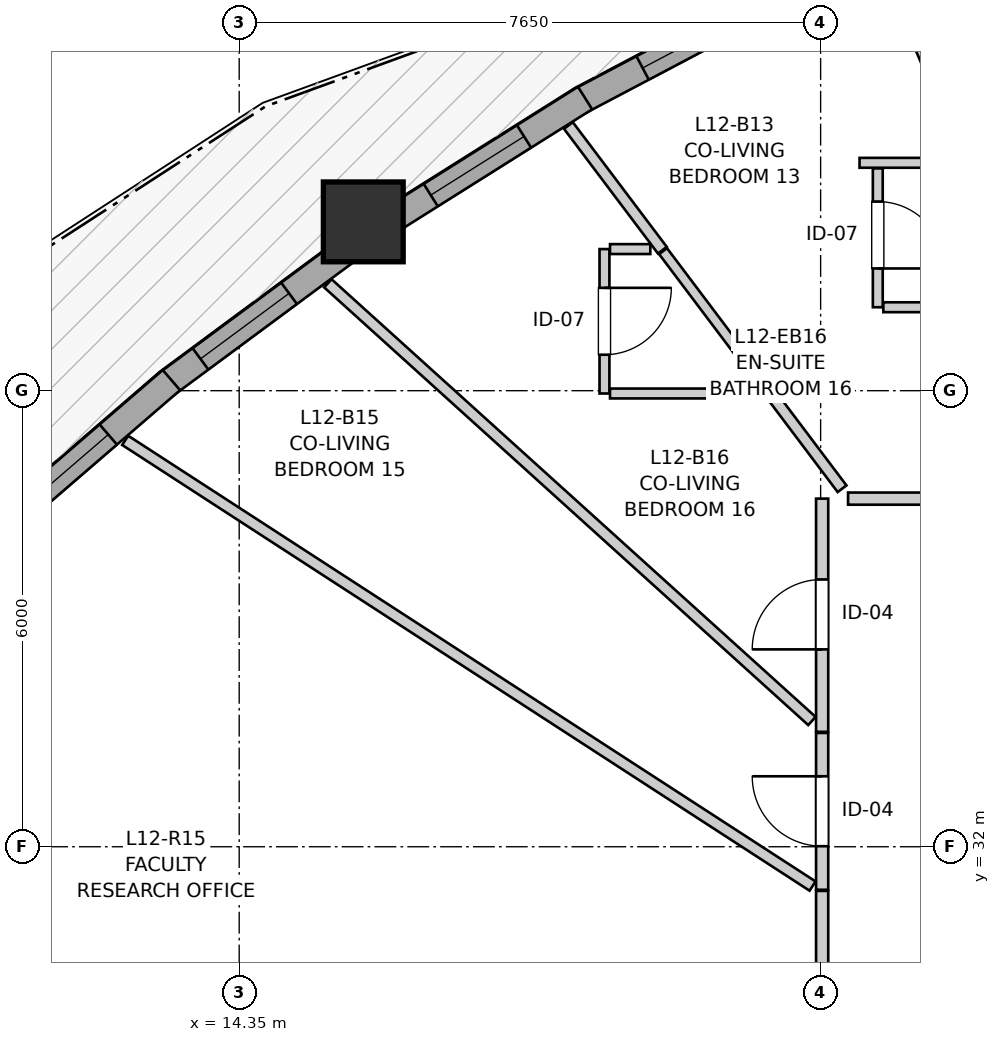
"""IFC4 building model, lengths in metres.
Left out: names, types, materials, properties, quantities, classifications, styles, units other than length and angle.
Written with IfcOpenShell. Run it as: python <this file> out.ifc"""

import sys

from ifc_helpers import new_model, si_unit, direction, frame, frame_2d, origin, origin_2d, place, context, subcontext, project, spatial, rectangle, extrude, source, transform, mapped, element, fill, save


model = new_model("IFC4")
c1 = context("Model", 3, precision=1e-05, world=origin(), true_north=direction((0.0, 1.0)))
c2 = subcontext(c1, "Body", "Model", "MODEL_VIEW")
j1 = project(units=[si_unit("LENGTHUNIT", "METRE"), si_unit("PLANEANGLEUNIT", "RADIAN")], contexts=[c1])
p1 = place(None, origin())
s1 = spatial("IfcSite", under=j1, at=p1, CompositionType="ELEMENT")
p2 = place(p1, origin())
s2 = spatial("IfcBuilding", under=s1, at=p2, CompositionType="ELEMENT")
p3 = place(p2, frame((0.0, 0.0, 43.0)))
s3 = spatial("IfcBuildingStorey", under=s2, at=p3, CompositionType="ELEMENT", Elevation=43.0)
m1 = source(origin(), c2, "Body", "SweptSolid", [
    extrude(rectangle(XDim=1.05, YDim=1.05, at=origin_2d()), origin(), (0.0, 0.0, 1.0), 2.94),
])
p4 = place(p3, frame((15.983, 40.221, 0.0), z_axis=(0.0, 0.0, 1.0), x_axis=(1.0, 0.0, 0.0)))
e1 = element("IfcColumn", 1, at=p4, inside=s3, PredefinedType="COLUMN", context=c2, shape_type="MappedRepresentation", body=[
    mapped(m1, transform((0.0, 0.0, 0.0), x_axis=(1.0, 0.0, 0.0), y_axis=(0.0, 1.0, 0.0), z_axis=(0.0, 0.0, 1.0), scale=1.0)),
])
p5 = place(p3, frame((21.757, 43.354, 0.0), z_axis=(0.0, 0.0, 1.0), x_axis=(-0.884394035355, -0.466741031224, 0.0)))
e2 = element("IfcWall", 2, at=p5, inside=s3, PredefinedType="SOLIDWALL", context=c2, shape_type="SweptSolid", body=[
    extrude(rectangle(XDim=3.317, YDim=0.35, at=frame_2d((1.659, 0.0))), origin(), (0.0, 0.0, 1.0), 2.42),
])
p6 = place(p5, frame((0.924, 0.0, 0.82)))
e3 = element("IfcOpeningElement", 3, at=p6, cuts=e2, PredefinedType="OPENING", context=c2, shape_type="SweptSolid", body=[
    extrude(rectangle(XDim=1.45, YDim=1.25, at=frame_2d((0.725, 0.625))), frame((0.0, 0.185, 0.0), z_axis=(0.0, -1.0, 0.0), x_axis=(1.0, 0.0, 0.0)), (0.0, 0.0, 1.0), 0.37),
])
p7 = place(p3, frame((18.901, 41.85, 0.0), z_axis=(0.0, 0.0, 1.0), x_axis=(-0.846436796602, -0.532489201167, 0.0)))
e4 = element("IfcWall", 4, at=p7, inside=s3, PredefinedType="SOLIDWALL", context=c2, shape_type="SweptSolid", body=[
    extrude(rectangle(XDim=3.038, YDim=0.35, at=frame_2d((1.519, 0.0))), origin(), (0.0, 0.0, 1.0), 2.42),
])
p8 = place(p7, frame((0.948, 0.0, 0.82)))
e5 = element("IfcOpeningElement", 5, at=p8, cuts=e4, PredefinedType="OPENING", context=c2, shape_type="SweptSolid", body=[
    extrude(rectangle(XDim=1.45, YDim=1.25, at=frame_2d((0.725, 0.625))), frame((0.0, 0.185, 0.0), z_axis=(0.0, -1.0, 0.0), x_axis=(1.0, 0.0, 0.0)), (0.0, 0.0, 1.0), 0.37),
])
p9 = place(p3, frame((15.846, 39.902, 0.0), z_axis=(0.0, 0.0, 1.0), x_axis=(-0.803789189233, -0.594914228501, 0.0)))
e6 = element("IfcWall", 6, at=p9, inside=s3, PredefinedType="SOLIDWALL", context=c2, shape_type="SweptSolid", body=[
    extrude(rectangle(XDim=3.056, YDim=0.35, at=frame_2d((1.528, 0.0))), origin(), (0.0, 0.0, 1.0), 2.42),
])
p10 = place(p9, frame((1.044, 0.0, 0.82)))
e7 = element("IfcOpeningElement", 7, at=p10, cuts=e6, PredefinedType="OPENING", context=c2, shape_type="SweptSolid", body=[
    extrude(rectangle(XDim=1.45, YDim=1.25, at=frame_2d((0.725, 0.625))), frame((0.0, 0.185, 0.0), z_axis=(0.0, -1.0, 0.0), x_axis=(1.0, 0.0, 0.0)), (0.0, 0.0, 1.0), 0.37),
])
p11 = place(p3, frame((13.458, 38.139, 0.0), z_axis=(0.0, 0.0, 1.0), x_axis=(-0.757450680395, -0.652892385289, 0.0)))
e8 = element("IfcWall", 8, at=p11, inside=s3, PredefinedType="SOLIDWALL", context=c2, shape_type="SweptSolid", body=[
    extrude(rectangle(XDim=3.374, YDim=0.35, at=frame_2d((1.687, 0.0))), origin(), (0.0, 0.0, 1.0), 2.42),
])
p12 = place(p11, frame((1.097, 0.0, 0.82)))
e9 = element("IfcOpeningElement", 9, at=p12, cuts=e8, PredefinedType="OPENING", context=c2, shape_type="SweptSolid", body=[
    extrude(rectangle(XDim=1.95, YDim=1.4, at=frame_2d((0.975, 0.7))), frame((0.0, 0.185, 0.0), z_axis=(0.0, -1.0, 0.0), x_axis=(1.0, 0.0, 0.0)), (0.0, 0.0, 1.0), 0.37),
])
p13 = place(p3, frame((22.02, 27.85, 0.0), z_axis=(0.0, 0.0, 1.0), x_axis=(0.0, 1.0, 0.0)))
e10 = element("IfcWall", 10, at=p13, inside=s3, PredefinedType="PARTITIONING", context=c2, shape_type="SweptSolid", body=[
    extrude(rectangle(XDim=3.569, YDim=0.16, at=frame_2d((1.784, 0.0))), origin(), (0.0, 0.0, 1.0), 2.94),
])
p14 = place(p13, frame((1.325, 0.0, 0.0)))
e11 = element("IfcOpeningElement", 11, at=p14, cuts=e10, PredefinedType="OPENING", context=c2, shape_type="SweptSolid", body=[
    extrude(rectangle(XDim=0.96, YDim=2.1, at=frame_2d((0.48, 1.05))), frame((0.0, 0.09, 0.0), z_axis=(0.0, -1.0, 0.0), x_axis=(1.0, 0.0, 0.0)), (0.0, 0.0, 1.0), 0.18),
])
p15 = place(p3, frame((22.361, 36.58, 0.0), z_axis=(0.0, 0.0, 1.0), x_axis=(1.0, 0.0, 0.0)))
e12 = element("IfcWall", 12, at=p15, inside=s3, PredefinedType="PARTITIONING", context=c2, shape_type="SweptSolid", body=[
    extrude(rectangle(XDim=3.498, YDim=0.16, at=frame_2d((1.749, 0.0))), origin(), (0.0, 0.0, 1.0), 2.548),
])
p16 = place(p15, frame((1.291, 0.0, 0.0)))
e13 = element("IfcOpeningElement", 13, at=p16, cuts=e12, PredefinedType="OPENING", context=c2, shape_type="SweptSolid", body=[
    extrude(rectangle(XDim=0.92, YDim=2.1, at=frame_2d((0.46, 1.05))), frame((0.0, 0.09, 0.0), z_axis=(0.0, -1.0, 0.0), x_axis=(1.0, 0.0, 0.0)), (0.0, 0.0, 1.0), 0.18),
])
p17 = place(p3, frame((22.02, 33.512, 0.0), z_axis=(0.0, 0.0, 1.0), x_axis=(0.0, 1.0, 0.0)))
e14 = element("IfcWall", 14, at=p17, inside=s3, PredefinedType="PARTITIONING", context=c2, shape_type="SweptSolid", body=[
    extrude(rectangle(XDim=3.068, YDim=0.16, at=frame_2d((1.534, 0.0))), origin(), (0.0, 0.0, 1.0), 2.94),
])
p18 = place(p17, frame((1.084, 0.0, 0.0)))
e15 = element("IfcOpeningElement", 15, at=p18, cuts=e14, PredefinedType="OPENING", context=c2, shape_type="SweptSolid", body=[
    extrude(rectangle(XDim=0.92, YDim=2.1, at=frame_2d((0.46, 1.05))), frame((0.0, 0.09, 0.0), z_axis=(0.0, -1.0, 0.0), x_axis=(1.0, 0.0, 0.0)), (0.0, 0.0, 1.0), 0.18),
])
p19 = place(p3, frame((22.02, 31.434, 0.0), z_axis=(0.0, 0.0, 1.0), x_axis=(0.0, 1.0, 0.0)))
e16 = element("IfcWall", 16, at=p19, inside=s3, PredefinedType="PARTITIONING", context=c2, shape_type="SweptSolid", body=[
    extrude(rectangle(XDim=2.063, YDim=0.16, at=frame_2d((1.031, 0.0))), origin(), (0.0, 0.0, 1.0), 2.94),
])
p20 = place(p19, frame((0.573, 0.0, 0.0)))
e17 = element("IfcOpeningElement", 17, at=p20, cuts=e16, PredefinedType="OPENING", context=c2, shape_type="SweptSolid", body=[
    extrude(rectangle(XDim=0.92, YDim=2.1, at=frame_2d((0.46, 1.05))), frame((0.0, 0.09, 0.0), z_axis=(0.0, -1.0, 0.0), x_axis=(1.0, 0.0, 0.0)), (0.0, 0.0, 1.0), 0.18),
])
p21 = place(p3, frame((22.752, 40.925, 0.0), z_axis=(0.0, 0.0, 1.0), x_axis=(0.0, -1.0, 0.0)))
e18 = element("IfcWall", 18, at=p21, inside=s3, PredefinedType="PARTITIONING", context=c2, shape_type="SweptSolid", body=[
    extrude(rectangle(XDim=1.827, YDim=0.13, at=frame_2d((0.914, 0.0))), origin(), (0.0, 0.0, 1.0), 2.94),
])
p22 = place(p21, frame((0.437, 0.0, 0.0)))
e19 = element("IfcOpeningElement", 19, at=p22, cuts=e18, PredefinedType="OPENING", context=c2, shape_type="SweptSolid", body=[
    extrude(rectangle(XDim=0.88, YDim=2.05, at=frame_2d((0.44, 1.025))), frame((0.0, 0.075, 0.0), z_axis=(0.0, -1.0, 0.0), x_axis=(1.0, 0.0, 0.0)), (0.0, 0.0, 1.0), 0.15),
])
p23 = place(p3, frame((19.156, 39.863, 0.0), z_axis=(0.0, 0.0, 1.0), x_axis=(0.0, -1.0, 0.0)))
e20 = element("IfcWall", 20, at=p23, inside=s3, PredefinedType="PARTITIONING", context=c2, shape_type="SweptSolid", body=[
    extrude(rectangle(XDim=1.9, YDim=0.13, at=frame_2d((0.95, 0.0))), origin(), (0.0, 0.0, 1.0), 2.94),
])
p24 = place(p23, frame((0.51, 0.0, 0.0)))
e21 = element("IfcOpeningElement", 21, at=p24, cuts=e20, PredefinedType="OPENING", context=c2, shape_type="SweptSolid", body=[
    extrude(rectangle(XDim=0.88, YDim=2.05, at=frame_2d((0.44, 1.025))), frame((0.0, 0.075, 0.0), z_axis=(0.0, -1.0, 0.0), x_axis=(1.0, 0.0, 0.0)), (0.0, 0.0, 1.0), 0.15),
])
p25 = place(p3, frame((12.85, 37.347, 0.0), z_axis=(0.0, 0.0, 1.0), x_axis=(0.839070272759, -0.544023048567, 0.0)))
e22 = element("IfcWall", 22, at=p25, inside=s3, PredefinedType="PARTITIONING", context=c2, shape_type="SweptSolid", body=[
    extrude(rectangle(XDim=10.779, YDim=0.145, at=frame_2d((5.389, 0.0))), origin(), (0.0, 0.0, 1.0), 2.94),
])
p26 = place(p3, frame((15.516, 39.413, 0.0), z_axis=(0.0, 0.0, 1.0), x_axis=(0.741796419009, -0.670625135784, 0.0)))
e23 = element("IfcWall", 23, at=p26, inside=s3, PredefinedType="PARTITIONING", context=c2, shape_type="SweptSolid", body=[
    extrude(rectangle(XDim=8.586, YDim=0.145, at=frame_2d((4.293, 0.0))), origin(), (0.0, 0.0, 1.0), 2.94),
])
p27 = place(p3, frame((22.841, 43.626, 0.0), z_axis=(0.0, 0.0, 1.0), x_axis=(0.392030625658, -0.919952166445, 0.0)))
e24 = element("IfcWall", 24, at=p27, inside=s3, PredefinedType="PARTITIONING", context=c2, shape_type="SweptSolid", body=[
    extrude(rectangle(XDim=2.747, YDim=0.145, at=frame_2d((1.374, 0.0))), origin(), (0.0, 0.0, 1.0), 2.94),
])
p28 = place(p3, frame((20.941, 38.49, 0.0), z_axis=(0.0, 0.0, 1.0), x_axis=(0.601733790382, -0.798696716853, 0.0)))
e25 = element("IfcWall", 25, at=p28, inside=s3, PredefinedType="PARTITIONING", context=c2, shape_type="SweptSolid", body=[
    extrude(rectangle(XDim=2.229, YDim=0.145, at=frame_2d((1.114, 0.0))), origin(), (0.0, 0.0, 1.0), 2.94),
])
p29 = place(p3, frame((18.681, 41.489, 0.0), z_axis=(0.0, 0.0, 1.0), x_axis=(0.601842551228, -0.79861476541, 0.0)))
e26 = element("IfcWall", 26, at=p29, inside=s3, PredefinedType="PARTITIONING", context=c2, shape_type="SweptSolid", body=[
    extrude(rectangle(XDim=2.055, YDim=0.145, at=frame_2d((1.027, 0.0))), origin(), (0.0, 0.0, 1.0), 2.94),
])
p30 = place(p3, frame((22.825, 39.098, 0.0), z_axis=(0.0, 0.0, 1.0), x_axis=(1.0, 0.0, 0.0)))
e27 = element("IfcWall", 27, at=p30, inside=s3, PredefinedType="PARTITIONING", context=c2, shape_type="SweptSolid", body=[
    extrude(rectangle(XDim=1.727, YDim=0.13, at=frame_2d((0.864, 0.0))), origin(), (0.0, 0.0, 1.0), 2.94),
])
p31 = place(p3, frame((19.229, 37.963, 0.0), z_axis=(0.0, 0.0, 1.0), x_axis=(1.0, 0.0, 0.0)))
e28 = element("IfcWall", 28, at=p31, inside=s3, PredefinedType="PARTITIONING", context=c2, shape_type="SweptSolid", body=[
    extrude(rectangle(XDim=1.727, YDim=0.13, at=frame_2d((0.864, 0.0))), origin(), (0.0, 0.0, 1.0), 2.508),
])
p32 = place(p3, frame((19.927, 39.836, 0.0), z_axis=(0.0, 0.0, 1.0), x_axis=(0.601846185739, -0.798612026401, 0.0)))
e29 = element("IfcWall", 29, at=p32, inside=s3, PredefinedType="PARTITIONING", context=c2, shape_type="SweptSolid", body=[
    extrude(rectangle(XDim=1.67, YDim=0.13, at=frame_2d((0.835, 0.0))), origin(), (0.0, 0.0, 1.0), 2.94),
])
p33 = place(p3, frame((22.512, 40.998, 0.0), z_axis=(0.0, 0.0, 1.0), x_axis=(1.0, 0.0, 0.0)))
e30 = element("IfcWall", 30, at=p33, inside=s3, PredefinedType="PARTITIONING", context=c2, shape_type="SweptSolid", body=[
    extrude(rectangle(XDim=1.689, YDim=0.13, at=frame_2d((0.844, 0.0))), origin(), (0.0, 0.0, 1.0), 2.94),
])
p34 = place(p3, frame((19.229, 39.863, 0.0), z_axis=(0.0, 0.0, 1.0), x_axis=(1.0, 0.0, 0.0)))
e31 = element("IfcWall", 31, at=p34, inside=s3, PredefinedType="PARTITIONING", context=c2, shape_type="SweptSolid", body=[
    extrude(rectangle(XDim=0.53, YDim=0.13, at=frame_2d((0.265, 0.0))), origin(), (0.0, 0.0, 1.0), 2.94),
])
p35 = place(p3, frame((20.956, 37.963, 0.0), z_axis=(0.0, 0.0, 1.0), x_axis=(0.0, 1.0, 0.0)))
e32 = element("IfcWall", 32, at=p35, inside=s3, PredefinedType="PARTITIONING", context=c2, shape_type="SweptSolid", body=[
    extrude(rectangle(XDim=0.417, YDim=0.13, at=frame_2d((0.208, 0.0))), origin(), (0.0, 0.0, 1.0), 2.94),
])
m2 = source(origin(), c2, "Body", "SweptSolid", [
    extrude(rectangle(XDim=1.45, YDim=1.25, at=frame_2d((0.725, 0.625))), frame((0.0, 0.03, 0.0), z_axis=(0.0, -1.0, 0.0), x_axis=(1.0, 0.0, 0.0)), (0.0, 0.0, 1.0), 0.06),
])
p36 = place(p6, origin())
e33 = element("IfcWindow", 33, at=p36, inside=s3, PartitioningType="SINGLE_PANEL", PredefinedType="WINDOW", context=c2, shape_type="MappedRepresentation", body=[
    mapped(m2, transform((0.0, 0.0, 0.0), x_axis=(1.0, 0.0, 0.0), y_axis=(0.0, 1.0, 0.0), z_axis=(0.0, 0.0, 1.0), scale=1.0)),
])
fill(e3, e33)
p37 = place(p8, origin())
e34 = element("IfcWindow", 34, at=p37, inside=s3, PartitioningType="SINGLE_PANEL", PredefinedType="WINDOW", context=c2, shape_type="MappedRepresentation", body=[
    mapped(m2, transform((0.0, 0.0, 0.0), x_axis=(1.0, 0.0, 0.0), y_axis=(0.0, 1.0, 0.0), z_axis=(0.0, 0.0, 1.0), scale=1.0)),
])
fill(e5, e34)
p38 = place(p10, origin())
e35 = element("IfcWindow", 35, at=p38, inside=s3, PartitioningType="SINGLE_PANEL", PredefinedType="WINDOW", context=c2, shape_type="MappedRepresentation", body=[
    mapped(m2, transform((0.0, 0.0, 0.0), x_axis=(1.0, 0.0, 0.0), y_axis=(0.0, 1.0, 0.0), z_axis=(0.0, 0.0, 1.0), scale=1.0)),
])
fill(e7, e35)
m3 = source(origin(), c2, "Body", "SweptSolid", [
    extrude(rectangle(XDim=1.95, YDim=1.4, at=frame_2d((0.975, 0.7))), frame((0.0, 0.03, 0.0), z_axis=(0.0, -1.0, 0.0), x_axis=(1.0, 0.0, 0.0)), (0.0, 0.0, 1.0), 0.06),
])
p39 = place(p12, origin())
e36 = element("IfcWindow", 36, at=p39, inside=s3, PartitioningType="SINGLE_PANEL", PredefinedType="WINDOW", context=c2, shape_type="MappedRepresentation", body=[
    mapped(m3, transform((0.0, 0.0, 0.0), x_axis=(1.0, 0.0, 0.0), y_axis=(0.0, 1.0, 0.0), z_axis=(0.0, 0.0, 1.0), scale=1.0)),
])
fill(e9, e36)
m4 = source(origin(), c2, "Body", "SweptSolid", [
    extrude(rectangle(XDim=0.92, YDim=2.1, at=frame_2d((0.46, 1.05))), frame((0.0, 0.025, 0.0), z_axis=(0.0, -1.0, 0.0), x_axis=(1.0, 0.0, 0.0)), (0.0, 0.0, 1.0), 0.05),
])
p40 = place(p18, origin())
e37 = element("IfcDoor", 37, at=p40, inside=s3, OperationType="SINGLE_SWING_LEFT", PredefinedType="DOOR", context=c2, shape_type="MappedRepresentation", body=[
    mapped(m4, transform((0.0, 0.0, 0.0), x_axis=(1.0, 0.0, 0.0), y_axis=(0.0, 1.0, 0.0), z_axis=(0.0, 0.0, 1.0), scale=1.0)),
])
fill(e15, e37)
p41 = place(p20, origin())
e38 = element("IfcDoor", 38, at=p41, inside=s3, OperationType="SINGLE_SWING_RIGHT", PredefinedType="DOOR", context=c2, shape_type="MappedRepresentation", body=[
    mapped(m4, transform((0.0, 0.0, 0.0), x_axis=(1.0, 0.0, 0.0), y_axis=(0.0, 1.0, 0.0), z_axis=(0.0, 0.0, 1.0), scale=1.0)),
])
fill(e17, e38)
m5 = source(origin(), c2, "Body", "SweptSolid", [
    extrude(rectangle(XDim=0.88, YDim=2.05, at=frame_2d((0.44, 1.025))), frame((0.0, 0.025, 0.0), z_axis=(0.0, -1.0, 0.0), x_axis=(1.0, 0.0, 0.0)), (0.0, 0.0, 1.0), 0.05),
])
p42 = place(p22, origin())
e39 = element("IfcDoor", 39, at=p42, inside=s3, OperationType="SINGLE_SWING_RIGHT", PredefinedType="DOOR", context=c2, shape_type="MappedRepresentation", body=[
    mapped(m5, transform((0.0, 0.0, 0.0), x_axis=(1.0, 0.0, 0.0), y_axis=(0.0, 1.0, 0.0), z_axis=(0.0, 0.0, 1.0), scale=1.0)),
])
fill(e19, e39)
p43 = place(p24, origin())
e40 = element("IfcDoor", 40, at=p43, inside=s3, OperationType="SINGLE_SWING_LEFT", PredefinedType="DOOR", context=c2, shape_type="MappedRepresentation", body=[
    mapped(m5, transform((0.0, 0.0, 0.0), x_axis=(1.0, 0.0, 0.0), y_axis=(0.0, 1.0, 0.0), z_axis=(0.0, 0.0, 1.0), scale=1.0)),
])
fill(e21, e40)
save(model, sys.argv[1])
